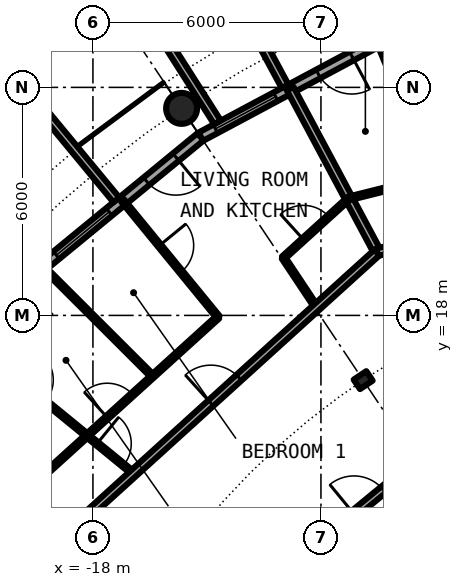
"""IFC4 building model, lengths in metres.
Left out: names, types, materials, properties, quantities, classifications, styles, units other than length and angle.
Written with IfcOpenShell. Run it as: python <this file> out.ifc"""

import sys

from ifc_helpers import new_model, si_unit, direction, frame, frame_2d, origin, origin_2d, place, context, subcontext, project, spatial, rectangle, hollow_circle, i_section, extrude, element, fill, save


model = new_model("IFC4")
c1 = context("Model", 3, precision=1e-05, world=origin(), true_north=direction((0.0, 1.0)))
c2 = subcontext(c1, "Body", "Model", "MODEL_VIEW")
j1 = project(units=[si_unit("LENGTHUNIT", "METRE"), si_unit("PLANEANGLEUNIT", "RADIAN")], contexts=[c1])
p1 = place(None, origin())
s1 = spatial("IfcSite", under=j1, at=p1, CompositionType="ELEMENT")
p2 = place(p1, origin())
s2 = spatial("IfcBuilding", under=s1, at=p2, CompositionType="ELEMENT")
p3 = place(p2, frame((0.0, 0.0, 212.7)))
s3 = spatial("IfcBuildingStorey", under=s2, at=p3, CompositionType="ELEMENT", Elevation=212.7)
p4 = place(p3, frame((-15.667, 23.448, 0.0), z_axis=(0.0, 0.0, 1.0), x_axis=(1.0, 0.0, 0.0)))
e1 = element("IfcColumn", 1, at=p4, inside=s3, PredefinedType="COLUMN", context=c2, shape_type="SweptSolid", body=[
    extrude(hollow_circle(Radius=0.406, WallThickness=0.03, at=origin_2d()), origin(), (0.0, 0.0, 1.0), 3.05),
])
p5 = place(p3, frame((-10.889, 16.297, 0.0), z_axis=(0.0, 0.0, 1.0), x_axis=(-0.55557023302, 0.831469612303, 0.0)))
e2 = element("IfcColumn", 2, at=p5, inside=s3, PredefinedType="COLUMN", context=c2, shape_type="SweptSolid", body=[
    extrude(i_section(OverallWidth=0.3, OverallDepth=0.4, WebThickness=0.013, FlangeThickness=0.024, FilletRadius=0.027, at=origin_2d()), origin(), (0.0, 0.0, 1.0), 3.05),
])
p6 = place(p3, frame((-10.447, 25.222, 0.0), z_axis=(0.0, 0.0, 1.0), x_axis=(-0.881915646801, -0.471407246368, 0.0)))
e3 = element("IfcWall", 3, at=p6, inside=s3, PredefinedType="SOLIDWALL", context=c2, shape_type="SweptSolid", body=[
    extrude(rectangle(XDim=5.352, YDim=0.25, at=frame_2d((2.676, 0.0))), origin(), (0.0, 0.0, 1.0), 2.7),
])
p7 = place(p6, frame((0.841, 0.0, 0.0)))
e4 = element("IfcOpeningElement", 4, at=p7, cuts=e3, PredefinedType="OPENING", context=c2, shape_type="SweptSolid", body=[
    extrude(rectangle(XDim=1.0, YDim=2.2, at=frame_2d((0.5, 1.1))), frame((0.0, 0.135, 0.0), z_axis=(0.0, -1.0, 0.0), x_axis=(1.0, 0.0, 0.0)), (0.0, 0.0, 1.0), 0.27),
])
p8 = place(p6, frame((3.111, 0.0, 0.3)))
e5 = element("IfcOpeningElement", 5, at=p8, cuts=e3, PredefinedType="OPENING", context=c2, shape_type="SweptSolid", body=[
    extrude(rectangle(XDim=1.8, YDim=2.1, at=frame_2d((0.9, 1.05))), frame((0.0, 0.135, 0.0), z_axis=(0.0, -1.0, 0.0), x_axis=(1.0, 0.0, 0.0)), (0.0, 0.0, 1.0), 0.27),
])
p9 = place(p3, frame((-12.945, 24.029, -0.03), z_axis=(0.0, 0.0, 1.0), x_axis=(-0.474424310775, 0.88029629861, 0.0)))
e6 = element("IfcWall", 6, at=p9, inside=s3, PredefinedType="SOLIDWALL", context=c2, shape_type="SweptSolid", body=[
    extrude(rectangle(XDim=3.006, YDim=0.2, at=frame_2d((1.503, 0.0))), origin(), (0.0, 0.0, 1.0), 2.73),
])
p10 = place(p3, frame((-14.722, 23.079, -0.03), z_axis=(0.0, 0.0, 1.0), x_axis=(-0.537572179146, 0.843217737129, 0.0)))
e7 = element("IfcWall", 7, at=p10, inside=s3, PredefinedType="SOLIDWALL", context=c2, shape_type="SweptSolid", body=[
    extrude(rectangle(XDim=2.924, YDim=0.2, at=frame_2d((1.462, 0.0))), origin(), (0.0, 0.0, 1.0), 2.73),
])
p11 = place(p3, frame((-15.167, 22.699, 0.0), z_axis=(0.0, 0.0, 1.0), x_axis=(-0.773019449054, -0.634382322723, 0.0)))
e8 = element("IfcWall", 8, at=p11, inside=s3, PredefinedType="SOLIDWALL", context=c2, shape_type="SweptSolid", body=[
    extrude(rectangle(XDim=5.352, YDim=0.25, at=frame_2d((2.676, 0.0))), origin(), (0.0, 0.0, 1.0), 2.7),
])
p12 = place(p11, frame((0.841, 0.0, 0.0)))
e9 = element("IfcOpeningElement", 9, at=p12, cuts=e8, PredefinedType="OPENING", context=c2, shape_type="SweptSolid", body=[
    extrude(rectangle(XDim=1.0, YDim=2.2, at=frame_2d((0.5, 1.1))), frame((0.0, 0.135, 0.0), z_axis=(0.0, -1.0, 0.0), x_axis=(1.0, 0.0, 0.0)), (0.0, 0.0, 1.0), 0.27),
])
p13 = place(p11, frame((3.111, 0.0, 0.3)))
e10 = element("IfcOpeningElement", 10, at=p13, cuts=e8, PredefinedType="OPENING", context=c2, shape_type="SweptSolid", body=[
    extrude(rectangle(XDim=1.8, YDim=2.1, at=frame_2d((0.9, 1.05))), frame((0.0, 0.135, 0.0), z_axis=(0.0, -1.0, 0.0), x_axis=(1.0, 0.0, 0.0)), (0.0, 0.0, 1.0), 0.27),
])
p14 = place(p3, frame((-17.384, 21.041, -0.03), z_axis=(0.0, 0.0, 1.0), x_axis=(-0.63709551667, 0.770784861449, 0.0)))
e11 = element("IfcWall", 11, at=p14, inside=s3, PredefinedType="SOLIDWALL", context=c2, shape_type="SweptSolid", body=[
    extrude(rectangle(XDim=3.006, YDim=0.2, at=frame_2d((1.503, 0.0))), origin(), (0.0, 0.0, 1.0), 2.73),
])
p15 = place(p3, frame((-10.446, 25.086, 0.0), z_axis=(0.0, 0.0, 1.0), x_axis=(0.38420646001, -0.923247202046, 0.0)))
e12 = element("IfcWall", 12, at=p15, inside=s3, PredefinedType="PARTITIONING", context=c2, shape_type="SweptSolid", body=[
    extrude(rectangle(XDim=5.3, YDim=0.1, at=frame_2d((2.65, 0.0))), origin(), (0.0, 0.0, 1.0), 2.7),
])
p16 = place(p15, frame((4.065, 0.0, 0.0)))
e13 = element("IfcOpeningElement", 13, at=p16, cuts=e12, PredefinedType="OPENING", context=c2, shape_type="SweptSolid", body=[
    extrude(rectangle(XDim=0.9, YDim=2.3, at=frame_2d((0.45, 1.15))), frame((0.0, 0.06, 0.0), z_axis=(0.0, -1.0, 0.0), x_axis=(1.0, 0.0, 0.0)), (0.0, 0.0, 1.0), 0.12),
])
p17 = place(p15, frame((1.415, 0.0, 0.0)))
e14 = element("IfcOpeningElement", 14, at=p17, cuts=e12, PredefinedType="OPENING", context=c2, shape_type="SweptSolid", body=[
    extrude(rectangle(XDim=0.9, YDim=2.3, at=frame_2d((0.45, 1.15))), frame((0.0, 0.06, 0.0), z_axis=(0.0, -1.0, 0.0), x_axis=(1.0, 0.0, 0.0)), (0.0, 0.0, 1.0), 0.12),
])
p18 = place(p3, frame((-22.595, 15.098, 0.0), z_axis=(0.0, 0.0, 1.0), x_axis=(0.831387096605, -0.55569370664, 0.0)))
e15 = element("IfcWall", 15, at=p18, inside=s3, PredefinedType="PARTITIONING", context=c2, shape_type="SweptSolid", body=[
    extrude(rectangle(XDim=4.875, YDim=0.2, at=frame_2d((2.438, 0.0))), origin(), (0.0, 0.0, 1.0), 2.7),
])
p19 = place(p3, frame((-21.04, 17.199, 0.0), z_axis=(0.0, 0.0, 1.0), x_axis=(0.774310172558, -0.632806255241, 0.0)))
e16 = element("IfcWall", 16, at=p19, inside=s3, PredefinedType="PARTITIONING", context=c2, shape_type="SweptSolid", body=[
    extrude(rectangle(XDim=5.3, YDim=0.1, at=frame_2d((2.65, 0.0))), origin(), (0.0, 0.0, 1.0), 2.7),
])
p20 = place(p19, frame((4.066, 0.0, 0.0)))
e17 = element("IfcOpeningElement", 17, at=p20, cuts=e16, PredefinedType="OPENING", context=c2, shape_type="SweptSolid", body=[
    extrude(rectangle(XDim=0.9, YDim=2.3, at=frame_2d((0.45, 1.15))), frame((0.0, 0.06, 0.0), z_axis=(0.0, -1.0, 0.0), x_axis=(1.0, 0.0, 0.0)), (0.0, 0.0, 1.0), 0.12),
])
p21 = place(p19, frame((1.416, 0.0, 0.0)))
e18 = element("IfcOpeningElement", 18, at=p21, cuts=e16, PredefinedType="OPENING", context=c2, shape_type="SweptSolid", body=[
    extrude(rectangle(XDim=0.9, YDim=2.3, at=frame_2d((0.45, 1.15))), frame((0.0, 0.06, 0.0), z_axis=(0.0, -1.0, 0.0), x_axis=(1.0, 0.0, 0.0)), (0.0, 0.0, 1.0), 0.12),
])
p22 = place(p3, frame((-19.234, 19.197, 0.0), z_axis=(0.0, 0.0, 1.0), x_axis=(0.707722727509, -0.706490297858, 0.0)))
e19 = element("IfcWall", 19, at=p22, inside=s3, PredefinedType="PARTITIONING", context=c2, shape_type="SweptSolid", body=[
    extrude(rectangle(XDim=3.962, YDim=0.1, at=frame_2d((1.981, 0.0))), origin(), (0.0, 0.0, 1.0), 2.7),
])
p23 = place(p3, frame((-17.219, 21.023, 0.0), z_axis=(0.0, 0.0, 1.0), x_axis=(0.633590098448, -0.773668913133, 0.0)))
e20 = element("IfcWall", 20, at=p23, inside=s3, PredefinedType="PARTITIONING", context=c2, shape_type="SweptSolid", body=[
    extrude(rectangle(XDim=3.962, YDim=0.1, at=frame_2d((1.981, 0.0))), origin(), (0.0, 0.0, 1.0), 2.7),
])
p24 = place(p23, frame((1.531, 0.0, 0.0)))
e21 = element("IfcOpeningElement", 21, at=p24, cuts=e20, PredefinedType="OPENING", context=c2, shape_type="SweptSolid", body=[
    extrude(rectangle(XDim=0.9, YDim=2.3, at=frame_2d((0.45, 1.15))), frame((0.0, 0.06, 0.0), z_axis=(0.0, -1.0, 0.0), x_axis=(1.0, 0.0, 0.0)), (0.0, 0.0, 1.0), 0.12),
])
p25 = place(p3, frame((-12.988, 19.518, 0.0), z_axis=(0.0, 0.0, 1.0), x_axis=(0.554125989098, -0.832432813028, 0.0)))
e22 = element("IfcWall", 22, at=p25, inside=s3, PredefinedType="PARTITIONING", context=c2, shape_type="SweptSolid", body=[
    extrude(rectangle(XDim=1.57, YDim=0.1, at=frame_2d((0.785, 0.0))), origin(), (0.0, 0.0, 1.0), 2.7),
])
p26 = place(p3, frame((-12.809, 23.966, 0.0), z_axis=(0.0, 0.0, 1.0), x_axis=(0.471271812246, -0.881988026553, 0.0)))
e23 = element("IfcWall", 23, at=p26, inside=s3, PredefinedType="PARTITIONING", context=c2, shape_type="SweptSolid", body=[
    extrude(rectangle(XDim=4.874, YDim=0.2, at=frame_2d((2.437, 0.0))), origin(), (0.0, 0.0, 1.0), 2.7),
])
p27 = place(p3, frame((-14.717, 9.834, 0.0), z_axis=(0.0, 0.0, 1.0), x_axis=(0.773034536097, 0.634363938131, 0.0)))
e24 = element("IfcWall", 24, at=p27, inside=s3, PredefinedType="PARTITIONING", context=c2, shape_type="SweptSolid", body=[
    extrude(rectangle(XDim=10.277, YDim=0.2, at=frame_2d((5.138, 0.0))), origin(), (0.0, 0.0, 1.0), 2.7),
])
p28 = place(p27, frame((4.638, 0.0, 0.0)))
e25 = element("IfcOpeningElement", 25, at=p28, cuts=e24, PredefinedType="OPENING", context=c2, shape_type="SweptSolid", body=[
    extrude(rectangle(XDim=1.0, YDim=2.3, at=frame_2d((0.5, 1.15))), frame((0.0, 0.11, 0.0), z_axis=(0.0, -1.0, 0.0), x_axis=(1.0, 0.0, 0.0)), (0.0, 0.0, 1.0), 0.22),
])
p29 = place(p3, frame((-18.543, 12.386, 0.0), z_axis=(0.0, 0.0, 1.0), x_axis=(0.740853508928, 0.671666642248, 0.0)))
e26 = element("IfcWall", 26, at=p29, inside=s3, PredefinedType="PARTITIONING", context=c2, shape_type="SweptSolid", body=[
    extrude(rectangle(XDim=10.84, YDim=0.2, at=frame_2d((5.42, 0.0))), origin(), (0.0, 0.0, 1.0), 2.7),
])
p30 = place(p29, frame((4.921, 0.0, 0.0)))
e27 = element("IfcOpeningElement", 27, at=p30, cuts=e26, PredefinedType="OPENING", context=c2, shape_type="SweptSolid", body=[
    extrude(rectangle(XDim=1.0, YDim=2.3, at=frame_2d((0.5, 1.15))), frame((0.0, 0.11, 0.0), z_axis=(0.0, -1.0, 0.0), x_axis=(1.0, 0.0, 0.0)), (0.0, 0.0, 1.0), 0.22),
])
p31 = place(p3, frame((-10.521, 19.662, 0.0), z_axis=(0.0, 0.0, 1.0), x_axis=(0.969975443945, 0.243202874456, 0.0)))
e28 = element("IfcWall", 28, at=p31, inside=s3, PredefinedType="PARTITIONING", context=c2, shape_type="SweptSolid", body=[
    extrude(rectangle(XDim=10.847, YDim=0.2, at=frame_2d((5.423, 0.0))), origin(), (0.0, 0.0, 1.0), 2.7),
])
p32 = place(p31, frame((4.928, 0.0, 0.0)))
e29 = element("IfcOpeningElement", 29, at=p32, cuts=e28, PredefinedType="OPENING", context=c2, shape_type="SweptSolid", body=[
    extrude(rectangle(XDim=1.0, YDim=2.3, at=frame_2d((0.5, 1.15))), frame((0.0, 0.11, 0.0), z_axis=(0.0, -1.0, 0.0), x_axis=(1.0, 0.0, 0.0)), (0.0, 0.0, 1.0), 0.22),
])
p33 = place(p3, frame((-19.872, 13.278, 0.0), z_axis=(0.0, 0.0, 1.0), x_axis=(0.740923753351, 0.671589153962, 0.0)))
e30 = element("IfcWall", 30, at=p33, inside=s3, PredefinedType="PARTITIONING", context=c2, shape_type="SweptSolid", body=[
    extrude(rectangle(XDim=6.969, YDim=0.1, at=frame_2d((3.484, 0.0))), origin(), (0.0, 0.0, 1.0), 2.7),
])
p34 = place(p33, frame((3.034, 0.0, 0.0)))
e31 = element("IfcOpeningElement", 31, at=p34, cuts=e30, PredefinedType="OPENING", context=c2, shape_type="SweptSolid", body=[
    extrude(rectangle(XDim=0.9, YDim=2.3, at=frame_2d((0.45, 1.15))), frame((0.0, 0.06, 0.0), z_axis=(0.0, -1.0, 0.0), x_axis=(1.0, 0.0, 0.0)), (0.0, 0.0, 1.0), 0.12),
])
p35 = place(p3, frame((-12.993, 19.513, 0.0), z_axis=(0.0, 0.0, 1.0), x_axis=(0.74087097024, 0.671647381783, 0.0)))
e32 = element("IfcWall", 32, at=p35, inside=s3, PredefinedType="PARTITIONING", context=c2, shape_type="SweptSolid", body=[
    extrude(rectangle(XDim=2.324, YDim=0.1, at=frame_2d((1.162, 0.0))), origin(), (0.0, 0.0, 1.0), 2.7),
])
p36 = place(p35, frame((0.719, 0.0, 0.0)))
e33 = element("IfcOpeningElement", 33, at=p36, cuts=e32, PredefinedType="OPENING", context=c2, shape_type="SweptSolid", body=[
    extrude(rectangle(XDim=0.9, YDim=2.3, at=frame_2d((0.45, 1.15))), frame((0.0, 0.06, 0.0), z_axis=(0.0, -1.0, 0.0), x_axis=(1.0, 0.0, 0.0)), (0.0, 0.0, 1.0), 0.12),
])
p37 = place(p3, frame((-11.266, 21.078, 0.0), z_axis=(0.0, 0.0, 1.0), x_axis=(0.970072433546, 0.242815719578, 0.0)))
e34 = element("IfcWall", 34, at=p37, inside=s3, PredefinedType="PARTITIONING", context=c2, shape_type="SweptSolid", body=[
    extrude(rectangle(XDim=6.973, YDim=0.1, at=frame_2d((3.486, 0.0))), origin(), (0.0, 0.0, 1.0), 2.7),
])
p38 = place(p37, frame((3.036, 0.0, 0.0)))
e35 = element("IfcOpeningElement", 35, at=p38, cuts=e34, PredefinedType="OPENING", context=c2, shape_type="SweptSolid", body=[
    extrude(rectangle(XDim=0.9, YDim=2.3, at=frame_2d((0.45, 1.15))), frame((0.0, 0.06, 0.0), z_axis=(0.0, -1.0, 0.0), x_axis=(1.0, 0.0, 0.0)), (0.0, 0.0, 1.0), 0.12),
])
p39 = place(p7, origin())
e36 = element("IfcDoor", 36, at=p39, inside=s3, OperationType="SINGLE_SWING_LEFT", PredefinedType="DOOR", context=c2, shape_type="SweptSolid", body=[
    extrude(rectangle(XDim=1.0, YDim=2.2, at=frame_2d((0.5, 1.1))), frame((0.0, 0.025, 0.0), z_axis=(0.0, -1.0, 0.0), x_axis=(1.0, 0.0, 0.0)), (0.0, 0.0, 1.0), 0.05),
])
fill(e4, e36)
p40 = place(p8, origin())
e37 = element("IfcWindow", 37, at=p40, inside=s3, PartitioningType="SINGLE_PANEL", PredefinedType="WINDOW", context=c2, shape_type="SweptSolid", body=[
    extrude(rectangle(XDim=1.8, YDim=2.1, at=frame_2d((0.9, 1.05))), frame((0.0, 0.03, 0.0), z_axis=(0.0, -1.0, 0.0), x_axis=(1.0, 0.0, 0.0)), (0.0, 0.0, 1.0), 0.06),
])
fill(e5, e37)
p41 = place(p12, origin())
e38 = element("IfcDoor", 38, at=p41, inside=s3, OperationType="SINGLE_SWING_LEFT", PredefinedType="DOOR", context=c2, shape_type="SweptSolid", body=[
    extrude(rectangle(XDim=1.0, YDim=2.2, at=frame_2d((0.5, 1.1))), frame((0.0, 0.025, 0.0), z_axis=(0.0, -1.0, 0.0), x_axis=(1.0, 0.0, 0.0)), (0.0, 0.0, 1.0), 0.05),
])
fill(e9, e38)
p42 = place(p13, origin())
e39 = element("IfcWindow", 39, at=p42, inside=s3, PartitioningType="SINGLE_PANEL", PredefinedType="WINDOW", context=c2, shape_type="SweptSolid", body=[
    extrude(rectangle(XDim=1.8, YDim=2.1, at=frame_2d((0.9, 1.05))), frame((0.0, 0.03, 0.0), z_axis=(0.0, -1.0, 0.0), x_axis=(1.0, 0.0, 0.0)), (0.0, 0.0, 1.0), 0.06),
])
fill(e10, e39)
p43 = place(p30, origin())
e40 = element("IfcDoor", 40, at=p43, inside=s3, OperationType="SINGLE_SWING_RIGHT", PredefinedType="DOOR", context=c2, shape_type="SweptSolid", body=[
    extrude(rectangle(XDim=1.0, YDim=2.3, at=frame_2d((0.5, 1.15))), frame((0.0, 0.025, 0.0), z_axis=(0.0, -1.0, 0.0), x_axis=(1.0, 0.0, 0.0)), (0.0, 0.0, 1.0), 0.05),
])
fill(e27, e40)
p44 = place(p36, origin())
e41 = element("IfcDoor", 41, at=p44, inside=s3, OperationType="SINGLE_SWING_RIGHT", PredefinedType="DOOR", context=c2, shape_type="SweptSolid", body=[
    extrude(rectangle(XDim=0.9, YDim=2.3, at=frame_2d((0.45, 1.15))), frame((0.0, 0.025, 0.0), z_axis=(0.0, -1.0, 0.0), x_axis=(1.0, 0.0, 0.0)), (0.0, 0.0, 1.0), 0.05),
])
fill(e33, e41)
p45 = place(p20, origin())
e42 = element("IfcDoor", 42, at=p45, inside=s3, OperationType="SINGLE_SWING_RIGHT", PredefinedType="DOOR", context=c2, shape_type="SweptSolid", body=[
    extrude(rectangle(XDim=0.9, YDim=2.3, at=frame_2d((0.45, 1.15))), frame((0.0, 0.025, 0.0), z_axis=(0.0, -1.0, 0.0), x_axis=(1.0, 0.0, 0.0)), (0.0, 0.0, 1.0), 0.05),
])
fill(e17, e42)
p46 = place(p24, origin())
e43 = element("IfcDoor", 43, at=p46, inside=s3, OperationType="SINGLE_SWING_LEFT", PredefinedType="DOOR", context=c2, shape_type="SweptSolid", body=[
    extrude(rectangle(XDim=0.9, YDim=2.3, at=frame_2d((0.45, 1.15))), frame((0.0, 0.025, 0.0), z_axis=(0.0, -1.0, 0.0), x_axis=(1.0, 0.0, 0.0)), (0.0, 0.0, 1.0), 0.05),
])
fill(e21, e43)
p47 = place(p34, origin())
e44 = element("IfcDoor", 44, at=p47, inside=s3, OperationType="SINGLE_SWING_RIGHT", PredefinedType="DOOR", context=c2, shape_type="SweptSolid", body=[
    extrude(rectangle(XDim=0.9, YDim=2.3, at=frame_2d((0.45, 1.15))), frame((0.0, 0.025, 0.0), z_axis=(0.0, -1.0, 0.0), x_axis=(1.0, 0.0, 0.0)), (0.0, 0.0, 1.0), 0.05),
])
fill(e31, e44)
p48 = place(p28, origin())
e45 = element("IfcDoor", 45, at=p48, inside=s3, OperationType="SINGLE_SWING_LEFT", PredefinedType="DOOR", context=c2, shape_type="SweptSolid", body=[
    extrude(rectangle(XDim=1.0, YDim=2.3, at=frame_2d((0.5, 1.15))), frame((0.0, 0.025, 0.0), z_axis=(0.0, -1.0, 0.0), x_axis=(1.0, 0.0, 0.0)), (0.0, 0.0, 1.0), 0.05),
])
fill(e25, e45)
save(model, sys.argv[1])
